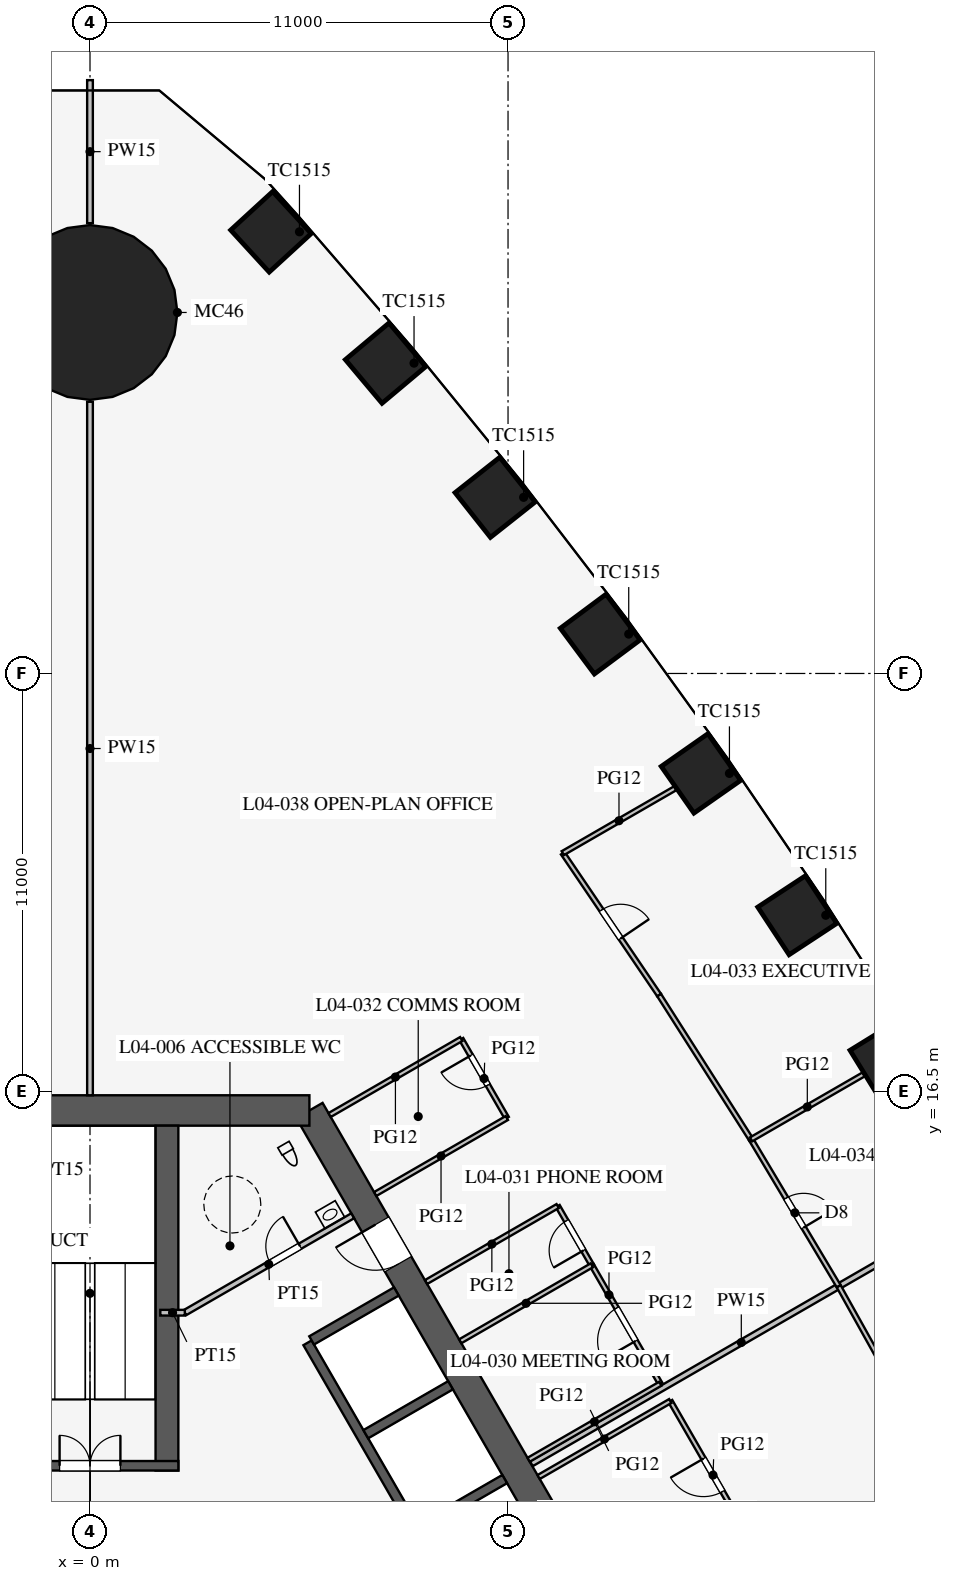
"""IFC4 building model, lengths in metres.
Left out: names, types, materials, properties, quantities, classifications, styles, units other than length and angle.
Written with IfcOpenShell. Run it as: python <this file> out.ifc"""

import sys

from ifc_helpers import new_model, si_unit, direction, frame, frame_2d, origin, origin_2d, place, context, subcontext, project, spatial, rectangle, circle, extrude, element, fill, save


model = new_model("IFC4")
c1 = context("Model", 3, precision=1e-05, world=origin(), true_north=direction((0.0, 1.0)))
c2 = subcontext(c1, "Body", "Model", "MODEL_VIEW")
j1 = project(units=[si_unit("LENGTHUNIT", "METRE"), si_unit("PLANEANGLEUNIT", "RADIAN")], contexts=[c1])
p1 = place(None, origin())
s1 = spatial("IfcSite", under=j1, at=p1, CompositionType="ELEMENT")
p2 = place(p1, origin())
s2 = spatial("IfcBuilding", under=s1, at=p2, CompositionType="ELEMENT")
p3 = place(p2, frame((0.0, 0.0, 20.7)))
s3 = spatial("IfcBuildingStorey", under=s2, at=p3, CompositionType="ELEMENT", Elevation=20.7)
for number, where, z_axis, x_axis in (
    (1, (21.031, 17.339, 0.0), (0.0, 0.0, 1.0), (-0.525, 0.851, 0.0)),
    (2, (18.611, 21.137, 0.0), (0.0, 0.0, 1.0), (-0.549, 0.836, 0.0)),
    (3, (16.076, 24.87, 0.0), (0.0, 0.0, 1.0), (-0.574, 0.819, 0.0)),
    (4, (13.426, 28.536, 0.0), (0.0, 0.0, 1.0), (-0.597, 0.802, 0.0)),
    (5, (10.66, 32.135, 0.0), (0.0, 0.0, 1.0), (-0.62, 0.784, 0.0)),
    (6, (7.776, 35.667, 0.0), (0.0, 0.0, 1.0), (-0.643, 0.766, 0.0)),
    (7, (4.762, 39.122, 0.0), (0.0, 0.0, 1.0), (-0.676, 0.737, 0.0)),
):
    element("IfcColumn", number, at=place(p3, frame(where, z_axis=z_axis, x_axis=x_axis)), inside=s3, PredefinedType="COLUMN", context=c2, shape_type="SweptSolid", body=[
        extrude(rectangle(XDim=1.5, YDim=1.5, at=origin_2d()), origin(), (0.0, 0.0, 1.0), 4.2),
    ])
p4 = place(p3, frame((0.0, 37.0, 0.0), z_axis=(0.0, 0.0, 1.0), x_axis=(1.0, 0.0, 0.0)))
e8 = element("IfcColumn", 8, at=p4, inside=s3, PredefinedType="COLUMN", context=c2, shape_type="SweptSolid", body=[
    extrude(circle(Radius=2.3, at=origin_2d()), origin(), (0.0, 0.0, 1.0), 4.2),
])
p5 = place(p3, frame((16.743, -3.0, 0.0), z_axis=(0.0, 0.0, 1.0), x_axis=(-0.500002442456, 0.866023993627, 0.0)))
e9 = element("IfcWall", 9, at=p5, inside=s3, PredefinedType="SHEAR", context=c2, shape_type="SweptSolid", body=[
    extrude(rectangle(XDim=21.939, YDim=0.8, at=frame_2d((10.97, 0.0))), origin(), (0.0, 0.0, 1.0), 4.2),
])
p6 = place(p5, frame((17.27, 0.0, 0.0)))
e10 = element("IfcOpeningElement", 10, at=p6, cuts=e9, PredefinedType="OPENING", context=c2, shape_type="SweptSolid", body=[
    extrude(rectangle(XDim=1.2, YDim=2.1, at=frame_2d((0.6, 1.05))), frame((0.0, 0.41, 0.0), z_axis=(0.0, -1.0, 0.0), x_axis=(1.0, 0.0, 0.0)), (0.0, 0.0, 1.0), 0.82),
])
p7 = place(p5, frame((3.47, 0.0, 0.0)))
e11 = element("IfcOpeningElement", 11, at=p7, cuts=e9, PredefinedType="OPENING", context=c2, shape_type="SweptSolid", body=[
    extrude(rectangle(XDim=1.2, YDim=2.1, at=frame_2d((0.6, 1.05))), frame((0.0, 0.41, 0.0), z_axis=(0.0, -1.0, 0.0), x_axis=(1.0, 0.0, 0.0)), (0.0, 0.0, 1.0), 0.82),
])
p8 = place(p3, frame((5.773, 16.0, 0.0), z_axis=(0.0, 0.0, 1.0), x_axis=(-1.0, 0.0, 0.0)))
e12 = element("IfcWall", 12, at=p8, inside=s3, PredefinedType="SHEAR", context=c2, shape_type="SweptSolid", body=[
    extrude(rectangle(XDim=11.547, YDim=0.8, at=frame_2d((5.773, 0.0))), origin(), (0.0, 0.0, 1.0), 4.2),
])
p9 = place(p3, frame((11.424, 0.014, 0.0), z_axis=(0.0, 0.0, 1.0), x_axis=(-0.500001763848, 0.866024385424, 0.0)))
e13 = element("IfcWall", 13, at=p9, inside=s3, PredefinedType="SHEAR", context=c2, shape_type="SweptSolid", body=[
    extrude(rectangle(XDim=11.4, YDim=0.25, at=frame_2d((5.7, 0.0))), origin(), (0.0, 0.0, 1.0), 4.2),
])
for number, where, z_axis, x_axis in (
    (14, (8.682, 5.012, 0.0), (0.0, 0.0, 1.0), (0.866, 0.5, 0.0)),
    (15, (7.257, 7.481, 0.0), (0.0, 0.0, 1.0), (0.866, 0.5, 0.0)),
):
    element("IfcWall", number, at=place(p3, frame(where, z_axis=z_axis, x_axis=x_axis)), inside=s3, PredefinedType="SHEAR", context=c2, shape_type="SweptSolid", body=[
        extrude(rectangle(XDim=2.575, YDim=0.25, at=frame_2d((1.288, 0.0))), origin(), (0.0, 0.0, 1.0), 4.2),
    ])
p10 = place(p3, frame((5.832, 9.949, 0.0), z_axis=(0.0, 0.0, 1.0), x_axis=(0.866029291668, 0.499993265928, 0.0)))
e16 = element("IfcWall", 16, at=p10, inside=s3, PredefinedType="SHEAR", context=c2, shape_type="SweptSolid", body=[
    extrude(rectangle(XDim=2.575, YDim=0.25, at=frame_2d((1.288, 0.0))), origin(), (0.0, 0.0, 1.0), 4.2),
])
p11 = place(p3, frame((2.025, 6.525, 0.0), z_axis=(0.0, 0.0, 1.0), x_axis=(0.0, 1.0, 0.0)))
e17 = element("IfcWall", 17, at=p11, inside=s3, PredefinedType="SHEAR", context=c2, shape_type="SweptSolid", body=[
    extrude(rectangle(XDim=9.075, YDim=0.6, at=frame_2d((4.538, 0.0))), origin(), (0.0, 0.0, 1.0), 4.2),
])
p12 = place(p3, frame((2.325, 6.65, 0.0), z_axis=(0.0, 0.0, 1.0), x_axis=(-1.0, 0.0, 0.0)))
e18 = element("IfcWall", 18, at=p12, inside=s3, PredefinedType="SHEAR", context=c2, shape_type="SweptSolid", body=[
    extrude(rectangle(XDim=4.65, YDim=0.25, at=frame_2d((2.325, 0.0))), origin(), (0.0, 0.0, 1.0), 4.2),
])
p13 = place(p12, frame((1.525, 0.0, 0.0)))
e19 = element("IfcOpeningElement", 19, at=p13, cuts=e18, PredefinedType="OPENING", context=c2, shape_type="SweptSolid", body=[
    extrude(rectangle(XDim=1.6, YDim=2.1, at=frame_2d((0.8, 1.05))), frame((0.0, 0.135, 0.0), z_axis=(0.0, -1.0, 0.0), x_axis=(1.0, 0.0, 0.0)), (0.0, 0.0, 1.0), 0.27),
])
p14 = place(p3, frame((2.495, 10.678, 0.0), z_axis=(0.0, 0.0, 1.0), x_axis=(0.86602216432, 0.500005610874, 0.0)))
e20 = element("IfcWall", 20, at=p14, inside=s3, PredefinedType="PARTITIONING", context=c2, shape_type="SweptSolid", body=[
    extrude(rectangle(XDim=5.1, YDim=0.15, at=frame_2d((2.55, 0.0))), origin(), (0.0, 0.0, 1.0), 4.0),
])
p15 = place(p14, frame((2.6, 0.0, 0.0)))
e21 = element("IfcOpeningElement", 21, at=p15, cuts=e20, PredefinedType="OPENING", context=c2, shape_type="SweptSolid", body=[
    extrude(rectangle(XDim=0.9, YDim=2.1, at=frame_2d((0.45, 1.05))), frame((0.0, 0.085, 0.0), z_axis=(0.0, -1.0, 0.0), x_axis=(1.0, 0.0, 0.0)), (0.0, 0.0, 1.0), 0.17),
])
p16 = place(p3, frame((2.495, 10.678, 0.0), z_axis=(0.0, 0.0, 1.0), x_axis=(-1.0, 0.0, 0.0)))
e22 = element("IfcWall", 22, at=p16, inside=s3, PredefinedType="PARTITIONING", context=c2, shape_type="SweptSolid", body=[
    extrude(rectangle(XDim=0.645, YDim=0.15, at=frame_2d((0.323, 0.0))), origin(), (0.0, 0.0, 1.0), 4.0),
])
p17 = place(p3, frame((0.0, 16.4, 0.0), z_axis=(0.0, 0.0, 1.0), x_axis=(0.0, 1.0, 0.0)))
e23 = element("IfcWall", 23, at=p17, inside=s3, PredefinedType="PARTITIONING", context=c2, shape_type="SweptSolid", body=[
    extrude(rectangle(XDim=18.25, YDim=0.15, at=frame_2d((9.125, 0.0))), origin(), (0.0, 0.0, 1.0), 2.3),
])
p18 = place(p3, frame((0.0, 39.35, 0.0), z_axis=(0.0, 0.0, 1.0), x_axis=(0.0, 1.0, 0.0)))
e24 = element("IfcWall", 24, at=p18, inside=s3, PredefinedType="PARTITIONING", context=c2, shape_type="SweptSolid", body=[
    extrude(rectangle(XDim=3.764, YDim=0.15, at=frame_2d((1.882, 0.0))), origin(), (0.0, 0.0, 1.0), 2.3),
])
p19 = place(p3, frame((11.613, 6.705, 0.0), z_axis=(0.0, 0.0, 1.0), x_axis=(0.86602785495, 0.499995754432, 0.0)))
e25 = element("IfcWall", 25, at=p19, inside=s3, PredefinedType="PARTITIONING", context=c2, shape_type="SweptSolid", body=[
    extrude(rectangle(XDim=12.759, YDim=0.15, at=frame_2d((6.379, 0.0))), origin(), (0.0, 0.0, 1.0), 3.2),
])
p20 = place(p3, frame((15.006, 8.808, 0.0), z_axis=(0.0, 0.0, 1.0), x_axis=(-0.500012057535, 0.866018442252, 0.0)))
e26 = element("IfcWall", 26, at=p20, inside=s3, PredefinedType="PARTITIONING", context=c2, shape_type="SweptSolid", body=[
    extrude(rectangle(XDim=3.6, YDim=0.12, at=frame_2d((1.8, 0.0))), origin(), (0.0, 0.0, 1.0), 2.9),
])
p21 = place(p20, frame((1.3, 0.0, 0.15)))
e27 = element("IfcOpeningElement", 27, at=p21, cuts=e26, PredefinedType="OPENING", context=c2, shape_type="SweptSolid", body=[
    extrude(rectangle(XDim=1.0, YDim=2.1, at=frame_2d((0.5, 1.05))), frame((0.0, 0.07, 0.0), z_axis=(0.0, -1.0, 0.0), x_axis=(1.0, 0.0, 0.0)), (0.0, 0.0, 1.0), 0.14),
])
p22 = place(p3, frame((13.206, 11.926, 0.0), z_axis=(0.0, 0.0, 1.0), x_axis=(-0.499961193289, 0.866047807691, 0.0)))
e28 = element("IfcWall", 28, at=p22, inside=s3, PredefinedType="PARTITIONING", context=c2, shape_type="SweptSolid", body=[
    extrude(rectangle(XDim=1.8, YDim=0.12, at=frame_2d((0.9, 0.0))), origin(), (0.0, 0.0, 1.0), 2.9),
])
p23 = place(p22, frame((0.45, 0.0, 0.15)))
e29 = element("IfcOpeningElement", 29, at=p23, cuts=e28, PredefinedType="OPENING", context=c2, shape_type="SweptSolid", body=[
    extrude(rectangle(XDim=0.9, YDim=2.1, at=frame_2d((0.45, 1.05))), frame((0.0, 0.07, 0.0), z_axis=(0.0, -1.0, 0.0), x_axis=(1.0, 0.0, 0.0)), (0.0, 0.0, 1.0), 0.14),
])
p24 = place(p3, frame((10.969, 15.802, 0.0), z_axis=(0.0, 0.0, 1.0), x_axis=(-0.500001309137, 0.866024647952, 0.0)))
e30 = element("IfcWall", 30, at=p24, inside=s3, PredefinedType="PARTITIONING", context=c2, shape_type="SweptSolid", body=[
    extrude(rectangle(XDim=2.4, YDim=0.12, at=frame_2d((1.2, 0.0))), origin(), (0.0, 0.0, 1.0), 2.9),
])
p25 = place(p24, frame((1.0, 0.0, 0.15)))
e31 = element("IfcOpeningElement", 31, at=p25, cuts=e30, PredefinedType="OPENING", context=c2, shape_type="SweptSolid", body=[
    extrude(rectangle(XDim=0.9, YDim=2.1, at=frame_2d((0.45, 1.05))), frame((0.0, 0.07, 0.0), z_axis=(0.0, -1.0, 0.0), x_axis=(1.0, 0.0, 0.0)), (0.0, 0.0, 1.0), 0.14),
])
p26 = place(p3, frame((17.519, 4.457, 0.0), z_axis=(0.0, 0.0, 1.0), x_axis=(-0.500013631625, 0.866017533419, 0.0)))
e32 = element("IfcWall", 32, at=p26, inside=s3, PredefinedType="PARTITIONING", context=c2, shape_type="SweptSolid", body=[
    extrude(rectangle(XDim=4.5, YDim=0.12, at=frame_2d((2.25, 0.0))), origin(), (0.0, 0.0, 1.0), 2.9),
])
p27 = place(p26, frame((1.75, 0.0, 0.15)))
e33 = element("IfcOpeningElement", 33, at=p27, cuts=e32, PredefinedType="OPENING", context=c2, shape_type="SweptSolid", body=[
    extrude(rectangle(XDim=1.0, YDim=2.1, at=frame_2d((0.5, 1.05))), frame((0.0, 0.07, 0.0), z_axis=(0.0, -1.0, 0.0), x_axis=(1.0, 0.0, 0.0)), (0.0, 0.0, 1.0), 0.14),
])
for number, where, z_axis, x_axis in (
    (34, (11.542, 6.808, 0.0), (0.0, 0.0, 1.0), (0.866, 0.5, 0.0)),
    (35, (6.305, 15.88, 0.0), (0.0, 0.0, 1.0), (0.866, 0.5, 0.0)),
    (36, (9.742, 9.926, 0.0), (0.0, 0.0, 1.0), (0.866, 0.5, 0.0)),
    (37, (8.842, 11.485, 0.0), (0.0, 0.0, 1.0), (0.866, 0.5, 0.0)),
    (38, (7.505, 13.802, 0.0), (0.0, 0.0, 1.0), (0.866, 0.5, 0.0)),
    (39, (11.805, 6.354, 0.0), (0.0, 0.0, 1.0), (0.866, 0.5, 0.0)),
):
    element("IfcWall", number, at=place(p3, frame(where, z_axis=z_axis, x_axis=x_axis)), inside=s3, PredefinedType="PARTITIONING", context=c2, shape_type="SweptSolid", body=[
        extrude(rectangle(XDim=4.0, YDim=0.12, at=frame_2d((2.0, 0.0))), origin(), (0.0, 0.0, 1.0), 2.9),
    ])
p28 = place(p3, frame((19.701, 11.374, 0.0), z_axis=(0.0, 0.0, 1.0), x_axis=(-0.512483962191, 0.858696796604, 0.0)))
e40 = element("IfcWall", 40, at=p28, inside=s3, PredefinedType="PARTITIONING", context=c2, shape_type="SweptSolid", body=[
    extrude(rectangle(XDim=4.5, YDim=0.12, at=frame_2d((2.25, 0.0))), origin(), (0.0, 0.0, 1.0), 2.9),
])
p29 = place(p28, frame((1.8, 0.0, 0.15)))
e41 = element("IfcOpeningElement", 41, at=p29, cuts=e40, PredefinedType="OPENING", context=c2, shape_type="SweptSolid", body=[
    extrude(rectangle(XDim=0.9, YDim=2.1, at=frame_2d((0.45, 1.05))), frame((0.0, 0.07, 0.0), z_axis=(0.0, -1.0, 0.0), x_axis=(1.0, 0.0, 0.0)), (0.0, 0.0, 1.0), 0.14),
])
p30 = place(p3, frame((17.395, 15.239, 0.0), z_axis=(0.0, 0.0, 1.0), x_axis=(-0.537243691336, 0.843427066272, 0.0)))
e42 = element("IfcWall", 42, at=p30, inside=s3, PredefinedType="PARTITIONING", context=c2, shape_type="SweptSolid", body=[
    extrude(rectangle(XDim=4.504, YDim=0.12, at=frame_2d((2.252, 0.0))), origin(), (0.0, 0.0, 1.0), 2.9),
])
p31 = place(p3, frame((14.975, 19.038, 0.0), z_axis=(0.0, 0.0, 1.0), x_axis=(-0.561512004239, 0.827468591002, 0.0)))
e43 = element("IfcWall", 43, at=p31, inside=s3, PredefinedType="PARTITIONING", context=c2, shape_type="SweptSolid", body=[
    extrude(rectangle(XDim=4.512, YDim=0.12, at=frame_2d((2.256, 0.0))), origin(), (0.0, 0.0, 1.0), 2.9),
])
p32 = place(p31, frame((1.8, 0.0, 0.15)))
e44 = element("IfcOpeningElement", 44, at=p32, cuts=e43, PredefinedType="OPENING", context=c2, shape_type="SweptSolid", body=[
    extrude(rectangle(XDim=0.9, YDim=2.1, at=frame_2d((0.45, 1.05))), frame((0.0, 0.07, 0.0), z_axis=(0.0, -1.0, 0.0), x_axis=(1.0, 0.0, 0.0)), (0.0, 0.0, 1.0), 0.14),
])
p33 = place(p3, frame((21.895, 7.445, 0.0), z_axis=(0.0, 0.0, 1.0), x_axis=(-0.487415216275, 0.87317031955, 0.0)))
e45 = element("IfcWall", 45, at=p33, inside=s3, PredefinedType="PARTITIONING", context=c2, shape_type="SweptSolid", body=[
    extrude(rectangle(XDim=4.5, YDim=0.12, at=frame_2d((2.25, 0.0))), origin(), (0.0, 0.0, 1.0), 2.9),
])
p34 = place(p3, frame((12.441, 22.771, 0.0), z_axis=(0.0, 0.0, 1.0), x_axis=(0.866016478054, 0.500015459501, 0.0)))
e46 = element("IfcWall", 46, at=p34, inside=s3, PredefinedType="PARTITIONING", context=c2, shape_type="SweptSolid", body=[
    extrude(rectangle(XDim=3.414, YDim=0.12, at=frame_2d((1.707, 0.0))), origin(), (0.0, 0.0, 1.0), 2.9),
])
p35 = place(p3, frame((17.395, 15.239, 0.0), z_axis=(0.0, 0.0, 1.0), x_axis=(0.866015553834, 0.500017060227, 0.0)))
e47 = element("IfcWall", 47, at=p35, inside=s3, PredefinedType="PARTITIONING", context=c2, shape_type="SweptSolid", body=[
    extrude(rectangle(XDim=3.419, YDim=0.12, at=frame_2d((1.71, 0.0))), origin(), (0.0, 0.0, 1.0), 2.9),
])
p36 = place(p15, origin())
e48 = element("IfcDoor", 48, at=p36, inside=s3, OperationType="SINGLE_SWING_RIGHT", PredefinedType="DOOR", context=c2, shape_type="SweptSolid", body=[
    extrude(rectangle(XDim=0.9, YDim=2.1, at=frame_2d((0.45, 1.05))), frame((0.0, 0.025, 0.0), z_axis=(0.0, -1.0, 0.0), x_axis=(1.0, 0.0, 0.0)), (0.0, 0.0, 1.0), 0.05),
])
fill(e21, e48)
p37 = place(p13, frame((1.6, 0.0, 0.0), z_axis=(0.0, 0.0, 1.0), x_axis=(-1.0, 0.0, 0.0)))
e49 = element("IfcDoor", 49, at=p37, inside=s3, OperationType="DOUBLE_DOOR_SINGLE_SWING", PredefinedType="DOOR", context=c2, shape_type="SweptSolid", body=[
    extrude(rectangle(XDim=1.6, YDim=2.1, at=frame_2d((0.8, 1.05))), frame((0.0, 0.025, 0.0), z_axis=(0.0, -1.0, 0.0), x_axis=(1.0, 0.0, 0.0)), (0.0, 0.0, 1.0), 0.05),
])
fill(e19, e49)
p38 = place(p6, origin())
e50 = element("IfcDoor", 50, at=p38, inside=s3, OperationType="SINGLE_SWING_RIGHT", PredefinedType="DOOR", context=c2, shape_type="SweptSolid", body=[
    extrude(rectangle(XDim=1.2, YDim=2.1, at=frame_2d((0.6, 1.05))), frame((0.0, 0.025, 0.0), z_axis=(0.0, -1.0, 0.0), x_axis=(1.0, 0.0, 0.0)), (0.0, 0.0, 1.0), 0.05),
])
fill(e10, e50)
p39 = place(p27, origin())
e51 = element("IfcDoor", 51, at=p39, inside=s3, OperationType="SINGLE_SWING_RIGHT", PredefinedType="DOOR", context=c2, shape_type="SweptSolid", body=[
    extrude(rectangle(XDim=1.0, YDim=2.1, at=frame_2d((0.5, 1.05))), frame((0.0, 0.025, 0.0), z_axis=(0.0, -1.0, 0.0), x_axis=(1.0, 0.0, 0.0)), (0.0, 0.0, 1.0), 0.05),
])
fill(e33, e51)
p40 = place(p21, origin())
e52 = element("IfcDoor", 52, at=p40, inside=s3, OperationType="SINGLE_SWING_LEFT", PredefinedType="DOOR", context=c2, shape_type="SweptSolid", body=[
    extrude(rectangle(XDim=1.0, YDim=2.1, at=frame_2d((0.5, 1.05))), frame((0.0, 0.025, 0.0), z_axis=(0.0, -1.0, 0.0), x_axis=(1.0, 0.0, 0.0)), (0.0, 0.0, 1.0), 0.05),
])
fill(e27, e52)
p41 = place(p23, origin())
e53 = element("IfcDoor", 53, at=p41, inside=s3, OperationType="SINGLE_SWING_LEFT", PredefinedType="DOOR", context=c2, shape_type="SweptSolid", body=[
    extrude(rectangle(XDim=0.9, YDim=2.1, at=frame_2d((0.45, 1.05))), frame((0.0, 0.025, 0.0), z_axis=(0.0, -1.0, 0.0), x_axis=(1.0, 0.0, 0.0)), (0.0, 0.0, 1.0), 0.05),
])
fill(e29, e53)
p42 = place(p25, origin())
e54 = element("IfcDoor", 54, at=p42, inside=s3, OperationType="SINGLE_SWING_RIGHT", PredefinedType="DOOR", context=c2, shape_type="SweptSolid", body=[
    extrude(rectangle(XDim=0.9, YDim=2.1, at=frame_2d((0.45, 1.05))), frame((0.0, 0.025, 0.0), z_axis=(0.0, -1.0, 0.0), x_axis=(1.0, 0.0, 0.0)), (0.0, 0.0, 1.0), 0.05),
])
fill(e31, e54)
p43 = place(p32, frame((0.9, 0.0, 0.0), z_axis=(0.0, 0.0, 1.0), x_axis=(-1.0, 0.0, 0.0)))
e55 = element("IfcDoor", 55, at=p43, inside=s3, OperationType="SINGLE_SWING_RIGHT", PredefinedType="DOOR", context=c2, shape_type="SweptSolid", body=[
    extrude(rectangle(XDim=0.9, YDim=2.1, at=frame_2d((0.45, 1.05))), frame((0.0, 0.025, 0.0), z_axis=(0.0, -1.0, 0.0), x_axis=(1.0, 0.0, 0.0)), (0.0, 0.0, 1.0), 0.05),
])
fill(e44, e55)
p44 = place(p29, frame((0.9, 0.0, 0.0), z_axis=(0.0, 0.0, 1.0), x_axis=(-1.0, 0.0, 0.0)))
e56 = element("IfcDoor", 56, at=p44, inside=s3, OperationType="SINGLE_SWING_RIGHT", PredefinedType="DOOR", context=c2, shape_type="SweptSolid", body=[
    extrude(rectangle(XDim=0.9, YDim=2.1, at=frame_2d((0.45, 1.05))), frame((0.0, 0.025, 0.0), z_axis=(0.0, -1.0, 0.0), x_axis=(1.0, 0.0, 0.0)), (0.0, 0.0, 1.0), 0.05),
])
fill(e41, e56)
save(model, sys.argv[1])
